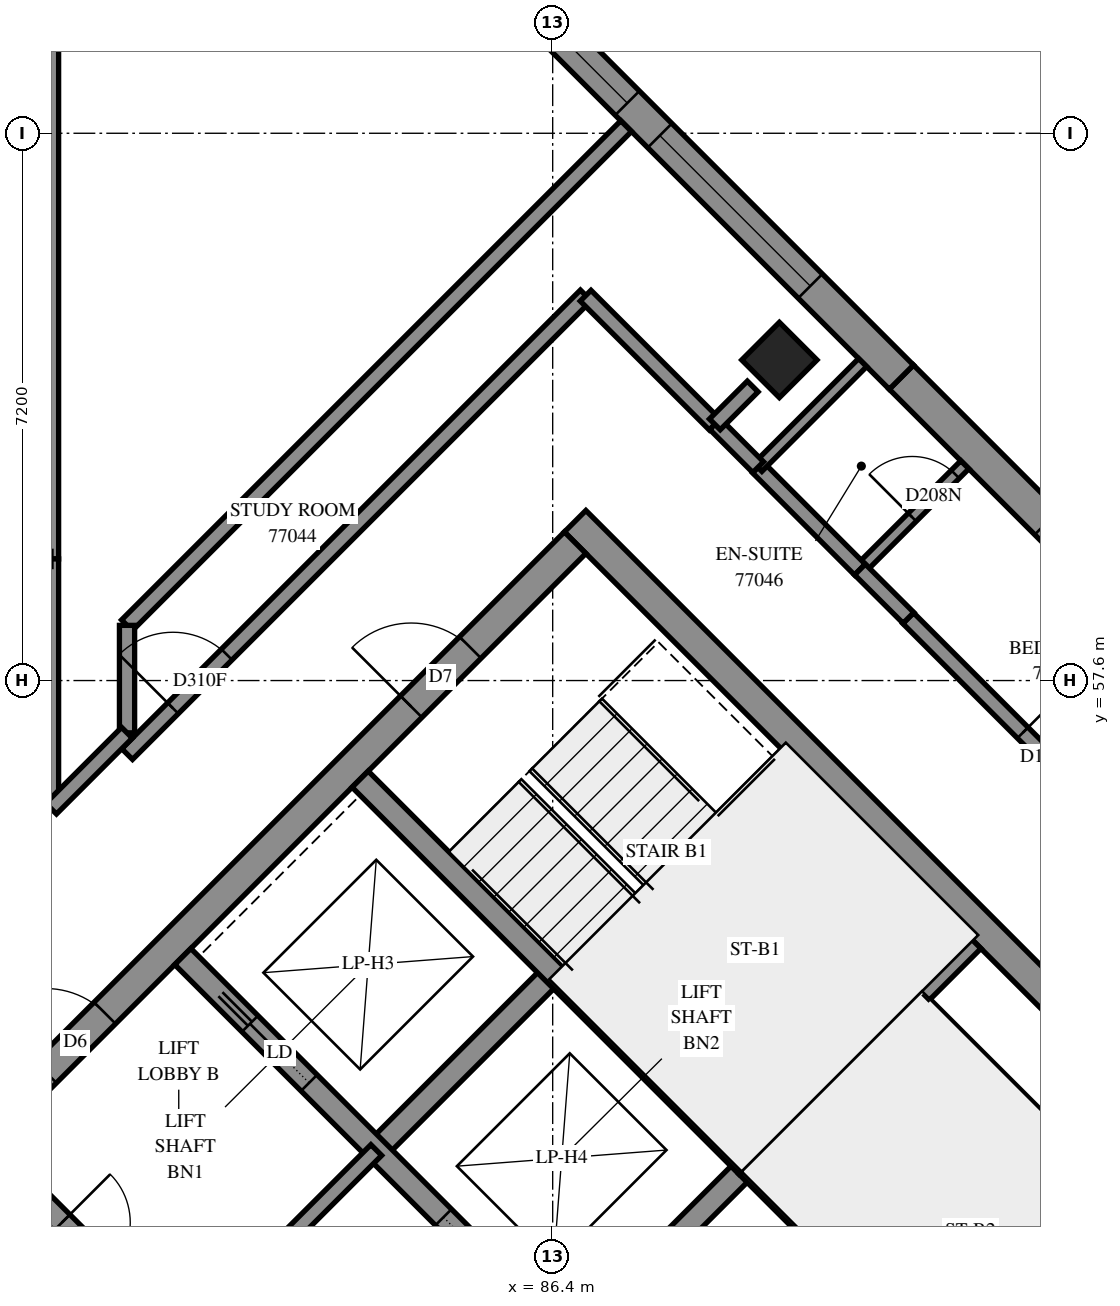
"""IFC4 building model, lengths in metres.
Left out: names, types, materials, properties, quantities, classifications, styles, units other than length and angle.
Written with IfcOpenShell. Run it as: python <this file> out.ifc"""

import sys

from ifc_helpers import new_model, si_unit, direction, frame, frame_2d, origin, origin_2d, place, context, subcontext, project, spatial, polyline, rectangle, outline, extrude, element, fill, save


model = new_model("IFC4")
c1 = context("Model", 3, precision=1e-05, world=origin(), true_north=direction((0.0, 1.0)))
c2 = subcontext(c1, "Body", "Model", "MODEL_VIEW")
j1 = project(units=[si_unit("LENGTHUNIT", "METRE"), si_unit("PLANEANGLEUNIT", "RADIAN")], contexts=[c1])
p1 = place(None, origin())
s1 = spatial("IfcSite", under=j1, at=p1, CompositionType="ELEMENT")
p2 = place(p1, origin())
s2 = spatial("IfcBuilding", under=s1, at=p2, CompositionType="ELEMENT")
p3 = place(p2, frame((0.0, 0.0, 281.2)))
s3 = spatial("IfcBuildingStorey", under=s2, at=p3, CompositionType="ELEMENT", Elevation=281.2)
p4 = place(p3, frame((89.382, 61.818, 0.0), z_axis=(0.0, 0.0, 1.0), x_axis=(0.7071067812, -0.7071067812, 0.0)))
e1 = element("IfcColumn", 1, at=p4, inside=s3, PredefinedType="COLUMN", context=c2, shape_type="SweptSolid", body=[
    extrude(rectangle(XDim=0.7, YDim=0.7, at=origin_2d()), origin(), (0.0, 0.0, 1.0), 3.1),
])
p5 = place(p3, frame((86.695, 59.696, -0.3), z_axis=(0.0, 0.0, 1.0), x_axis=(0.7071100706, -0.7071034917, 0.0)))
e2 = element("IfcWall", 2, at=p5, inside=s3, PredefinedType="SHEAR", context=c2, shape_type="SweptSolid", body=[
    extrude(rectangle(XDim=15.2, YDim=0.4, at=frame_2d((7.6, 0.0))), origin(), (0.0, 0.0, 1.0), 2.7),
])
p6 = place(p5, frame((10.4, 0.0, 0.3)))
e3 = element("IfcOpeningElement", 3, at=p6, cuts=e2, PredefinedType="OPENING", context=c2, shape_type="SweptSolid", body=[
    extrude(rectangle(XDim=0.8, YDim=2.1, at=frame_2d((0.4, 1.05))), frame((0.0, 0.21, 0.0), z_axis=(0.0, -1.0, 0.0), x_axis=(1.0, 0.0, 0.0)), (0.0, 0.0, 1.0), 0.42),
])
p7 = place(p3, frame((76.513, 49.231, -0.3), z_axis=(0.0, 0.0, 1.0), x_axis=(0.7071067812, 0.7071067812, 0.0)))
e4 = element("IfcWall", 4, at=p7, inside=s3, PredefinedType="SHEAR", context=c2, shape_type="SweptSolid", body=[
    extrude(rectangle(XDim=14.4, YDim=0.4, at=frame_2d((7.2, 0.0))), origin(), (0.0, 0.0, 1.0), 2.7),
])
p8 = place(p7, frame((4.55, 0.0, 0.3)))
e5 = element("IfcOpeningElement", 5, at=p8, cuts=e4, PredefinedType="OPENING", context=c2, shape_type="SweptSolid", body=[
    extrude(rectangle(XDim=1.1, YDim=2.1, at=frame_2d((0.55, 1.05))), frame((0.0, 0.21, 0.0), z_axis=(0.0, -1.0, 0.0), x_axis=(1.0, 0.0, 0.0)), (0.0, 0.0, 1.0), 0.42),
])
p9 = place(p7, frame((11.35, 0.0, 0.3)))
e6 = element("IfcOpeningElement", 6, at=p9, cuts=e4, PredefinedType="OPENING", context=c2, shape_type="SweptSolid", body=[
    extrude(rectangle(XDim=1.1, YDim=2.1, at=frame_2d((0.55, 1.05))), frame((0.0, 0.21, 0.0), z_axis=(0.0, -1.0, 0.0), x_axis=(1.0, 0.0, 0.0)), (0.0, 0.0, 1.0), 0.42),
])
p10 = place(p3, frame((84.079, 51.423, 0.0), z_axis=(0.0, 0.0, 1.0), x_axis=(0.7071219326, 0.7070916295, 0.0)))
e7 = element("IfcWall", 7, at=p10, inside=s3, PredefinedType="SOLIDWALL", context=c2, shape_type="SweptSolid", body=[
    extrude(rectangle(XDim=3.3, YDim=0.3, at=frame_2d((1.65, 0.0))), origin(), (0.0, 0.0, 1.0), 3.1),
])
p11 = place(p3, frame((86.625, 48.878, 0.0), z_axis=(0.0, 0.0, 1.0), x_axis=(0.7071067812, 0.7071067812, 0.0)))
e8 = element("IfcWall", 8, at=p11, inside=s3, PredefinedType="SOLIDWALL", context=c2, shape_type="SweptSolid", body=[
    extrude(rectangle(XDim=3.3, YDim=0.3, at=frame_2d((1.65, 0.0))), origin(), (0.0, 0.0, 1.0), 3.1),
])
p12 = place(p3, frame((78.988, 51.423, 0.0), z_axis=(0.0, 0.0, 1.0), x_axis=(0.7071067812, -0.7071067812, 0.0)))
e9 = element("IfcWall", 9, at=p12, inside=s3, PredefinedType="SOLIDWALL", context=c2, shape_type="SweptSolid", body=[
    extrude(rectangle(XDim=14.4, YDim=0.3, at=frame_2d((7.2, 0.0))), origin(), (0.0, 0.0, 1.0), 3.1),
])
p13 = place(p12, frame((1.35, 0.0, 0.0)))
e10 = element("IfcOpeningElement", 10, at=p13, cuts=e9, PredefinedType="OPENING", context=c2, shape_type="SweptSolid", body=[
    extrude(rectangle(XDim=0.9, YDim=2.1, at=frame_2d((0.45, 1.05))), frame((0.0, 0.16, 0.0), z_axis=(0.0, -1.0, 0.0), x_axis=(1.0, 0.0, 0.0)), (0.0, 0.0, 1.0), 0.32),
])
p14 = place(p12, frame((4.95, 0.0, 0.0)))
e11 = element("IfcOpeningElement", 11, at=p14, cuts=e9, PredefinedType="OPENING", context=c2, shape_type="SweptSolid", body=[
    extrude(rectangle(XDim=0.9, YDim=2.1, at=frame_2d((0.45, 1.05))), frame((0.0, 0.16, 0.0), z_axis=(0.0, -1.0, 0.0), x_axis=(1.0, 0.0, 0.0)), (0.0, 0.0, 1.0), 0.32),
])
p15 = place(p12, frame((8.55, 0.0, 0.0)))
e12 = element("IfcOpeningElement", 12, at=p15, cuts=e9, PredefinedType="OPENING", context=c2, shape_type="SweptSolid", body=[
    extrude(rectangle(XDim=0.9, YDim=2.1, at=frame_2d((0.45, 1.05))), frame((0.0, 0.16, 0.0), z_axis=(0.0, -1.0, 0.0), x_axis=(1.0, 0.0, 0.0)), (0.0, 0.0, 1.0), 0.32),
])
p16 = place(p12, frame((12.05, 0.0, 0.0)))
e13 = element("IfcOpeningElement", 13, at=p16, cuts=e9, PredefinedType="OPENING", context=c2, shape_type="SweptSolid", body=[
    extrude(rectangle(XDim=1.1, YDim=2.1, at=frame_2d((0.55, 1.05))), frame((0.0, 0.16, 0.0), z_axis=(0.0, -1.0, 0.0), x_axis=(1.0, 0.0, 0.0)), (0.0, 0.0, 1.0), 0.32),
])
p17 = place(p3, frame((81.534, 53.969, 0.0), z_axis=(0.0, 0.0, 1.0), x_axis=(0.707103309, -0.7071102534, 0.0)))
e14 = element("IfcWall", 14, at=p17, inside=s3, PredefinedType="SOLIDWALL", context=c2, shape_type="SweptSolid", body=[
    extrude(rectangle(XDim=14.4, YDim=0.3, at=frame_2d((7.2, 0.0))), origin(), (0.0, 0.0, 1.0), 3.1),
])
p18 = place(p17, frame((8.55, 0.0, 0.0)))
e15 = element("IfcOpeningElement", 15, at=p18, cuts=e14, PredefinedType="OPENING", context=c2, shape_type="SweptSolid", body=[
    extrude(rectangle(XDim=0.9, YDim=2.1, at=frame_2d((0.45, 1.05))), frame((0.0, 0.16, 0.0), z_axis=(0.0, -1.0, 0.0), x_axis=(1.0, 0.0, 0.0)), (0.0, 0.0, 1.0), 0.32),
])
p19 = place(p17, frame((1.25, 0.0, 0.0)))
e16 = element("IfcOpeningElement", 16, at=p19, cuts=e14, PredefinedType="OPENING", context=c2, shape_type="SweptSolid", body=[
    extrude(rectangle(XDim=1.1, YDim=2.1, at=frame_2d((0.55, 1.05))), frame((0.0, 0.16, 0.0), z_axis=(0.0, -1.0, 0.0), x_axis=(1.0, 0.0, 0.0)), (0.0, 0.0, 1.0), 0.32),
])
p20 = place(p17, frame((4.85, 0.0, 0.0)))
e17 = element("IfcOpeningElement", 17, at=p20, cuts=e14, PredefinedType="OPENING", context=c2, shape_type="SweptSolid", body=[
    extrude(rectangle(XDim=1.1, YDim=2.1, at=frame_2d((0.55, 1.05))), frame((0.0, 0.16, 0.0), z_axis=(0.0, -1.0, 0.0), x_axis=(1.0, 0.0, 0.0)), (0.0, 0.0, 1.0), 0.32),
])
p21 = place(p17, frame((12.05, 0.0, 0.0)))
e18 = element("IfcOpeningElement", 18, at=p21, cuts=e14, PredefinedType="OPENING", context=c2, shape_type="SweptSolid", body=[
    extrude(rectangle(XDim=1.1, YDim=2.1, at=frame_2d((0.55, 1.05))), frame((0.0, 0.16, 0.0), z_axis=(0.0, -1.0, 0.0), x_axis=(1.0, 0.0, 0.0)), (0.0, 0.0, 1.0), 0.32),
])
for number, where, z_axis, x_axis in (
    (19, (83.867, 56.302, 0.0), (0.0, 0.0, 1.0), (0.707, -0.707, 0.0)),
    (20, (88.958, 51.211, 0.0), (0.0, 0.0, 1.0), (0.707, -0.707, 0.0)),
):
    element("IfcWall", number, at=place(p3, frame(where, z_axis=z_axis, x_axis=x_axis)), inside=s3, PredefinedType="SOLIDWALL", context=c2, shape_type="SweptSolid", body=[
        extrude(rectangle(XDim=7.2, YDim=0.3, at=frame_2d((3.6, 0.0))), origin(), (0.0, 0.0, 1.0), 3.1),
    ])
p22 = place(p3, frame((88.958, 51.211, 0.0), z_axis=(0.0, 0.0, 1.0), x_axis=(0.7071067812, 0.7071067812, 0.0)))
e21 = element("IfcWall", 21, at=p22, inside=s3, PredefinedType="SOLIDWALL", context=c2, shape_type="SweptSolid", body=[
    extrude(rectangle(XDim=4.2, YDim=0.3, at=frame_2d((2.1, 0.0))), origin(), (0.0, 0.0, 1.0), 3.1),
])
p23 = place(p3, frame((95.712, 56.867, 0.0), z_axis=(0.0, 0.0, 1.0), x_axis=(-0.7071067812, 0.7071067812, 0.0)))
e22 = element("IfcWall", 22, at=p23, inside=s3, PredefinedType="SOLIDWALL", context=c2, shape_type="SweptSolid", body=[
    extrude(outline(polyline([(0.0, -0.225), (6.682, -0.225), (6.682, 0.225), (0.0, 0.225), (0.0, -0.225)])), origin(), (0.0, 0.0, 1.0), 3.1),
])
p24 = place(p23, frame((1.177, 0.0, 0.45)))
e23 = element("IfcOpeningElement", 23, at=p24, cuts=e22, PredefinedType="OPENING", context=c2, shape_type="SweptSolid", body=[
    extrude(rectangle(XDim=2.8, YDim=2.55, at=frame_2d((1.4, 1.275))), frame((0.0, 0.235, 0.0), z_axis=(0.0, -1.0, 0.0), x_axis=(1.0, 0.0, 0.0)), (0.0, 0.0, 1.0), 0.47),
])
p25 = place(p3, frame((90.987, 61.592, 0.0), z_axis=(0.0, 0.0, 1.0), x_axis=(-0.7071067812, 0.7071067812, 0.0)))
e24 = element("IfcWall", 24, at=p25, inside=s3, PredefinedType="SOLIDWALL", context=c2, shape_type="SweptSolid", body=[
    extrude(outline(polyline([(0.0, -0.225), (6.682, -0.225), (6.724, 0.225), (0.0, 0.225), (0.0, -0.225)])), origin(), (0.0, 0.0, 1.0), 3.1),
])
p26 = place(p25, frame((1.695, 0.0, 0.45)))
e25 = element("IfcOpeningElement", 25, at=p26, cuts=e24, PredefinedType="OPENING", context=c2, shape_type="SweptSolid", body=[
    extrude(rectangle(XDim=2.8, YDim=2.55, at=frame_2d((1.4, 1.275))), frame((0.0, 0.235, 0.0), z_axis=(0.0, -1.0, 0.0), x_axis=(1.0, 0.0, 0.0)), (0.0, 0.0, 1.0), 0.47),
])
p27 = place(p25, frame((5.099, 0.0, 0.45)))
e26 = element("IfcOpeningElement", 26, at=p27, cuts=e24, PredefinedType="OPENING", context=c2, shape_type="SweptSolid", body=[
    extrude(rectangle(XDim=1.2, YDim=2.55, at=frame_2d((0.6, 1.275))), frame((0.0, 0.235, 0.0), z_axis=(0.0, -1.0, 0.0), x_axis=(1.0, 0.0, 0.0)), (0.0, 0.0, 1.0), 0.47),
])
p28 = place(p3, frame((91.313, 53.354, 0.0), z_axis=(0.0, 0.0, 1.0), x_axis=(0.7071067812, -0.7071067812, 0.0)))
e27 = element("IfcWall", 27, at=p28, inside=s3, PredefinedType="PARTITIONING", context=c2, shape_type="SweptSolid", body=[
    extrude(rectangle(XDim=5.65, YDim=0.15, at=frame_2d((2.825, 0.0))), origin(), (0.0, 0.0, 1.0), 3.1),
])
p29 = place(p3, frame((81.534, 48.878, 0.0), z_axis=(0.0, 0.0, 1.0), x_axis=(0.707092892, 0.7071206701, 0.0)))
e28 = element("IfcWall", 28, at=p29, inside=s3, PredefinedType="PARTITIONING", context=c2, shape_type="SweptSolid", body=[
    extrude(rectangle(XDim=3.6, YDim=0.2, at=frame_2d((1.8, 0.0))), origin(), (0.0, 0.0, 1.0), 3.1),
])
p30 = place(p3, frame((79.8, 59.2, 0.0), z_axis=(0.0, 0.0, 1.0), x_axis=(0.0, 1.0, 0.0)))
e29 = element("IfcWall", 29, at=p30, inside=s3, PredefinedType="PARTITIONING", context=c2, shape_type="SweptSolid", body=[
    extrude(rectangle(XDim=13.8, YDim=0.2, at=frame_2d((6.9, 0.0))), origin(), (0.0, 0.0, 1.0), 3.1),
])
p31 = place(p3, frame((80.799, 58.327, 0.0), z_axis=(0.0, 0.0, 1.0), x_axis=(0.7071121647, 0.7071013977, 0.0)))
e30 = element("IfcWall", 30, at=p31, inside=s3, PredefinedType="PARTITIONING", context=c2, shape_type="SweptSolid", body=[
    extrude(rectangle(XDim=9.288, YDim=0.2, at=frame_2d((4.644, 0.0))), origin(), (0.0, 0.0, 1.0), 3.1),
])
p32 = place(p3, frame((80.802, 56.633, 0.0), z_axis=(0.0, 0.0, 1.0), x_axis=(0.7071067812, 0.7071067812, 0.0)))
e31 = element("IfcWall", 31, at=p32, inside=s3, PredefinedType="PARTITIONING", context=c2, shape_type="SweptSolid", body=[
    extrude(rectangle(XDim=8.533, YDim=0.2, at=frame_2d((4.267, 0.0))), origin(), (0.0, 0.0, 1.0), 3.1),
])
p33 = place(p32, frame((0.853, 0.0, 0.0)))
e32 = element("IfcOpeningElement", 32, at=p33, cuts=e31, PredefinedType="OPENING", context=c2, shape_type="SweptSolid", body=[
    extrude(rectangle(XDim=1.0, YDim=2.1, at=frame_2d((0.5, 1.05))), frame((0.0, 0.11, 0.0), z_axis=(0.0, -1.0, 0.0), x_axis=(1.0, 0.0, 0.0)), (0.0, 0.0, 1.0), 0.22),
])
p34 = place(p3, frame((91.077, 58.421, 0.0), z_axis=(0.0, 0.0, 1.0), x_axis=(0.7069869563, -0.7072265858, 0.0)))
e33 = element("IfcWall", 33, at=p34, inside=s3, PredefinedType="PARTITIONING", context=c2, shape_type="SweptSolid", body=[
    extrude(rectangle(XDim=5.008, YDim=0.2, at=frame_2d((2.504, 0.0))), origin(), (0.0, 0.0, 1.0), 3.1),
])
p35 = place(p34, frame((2.132, 0.0, 0.0)))
e34 = element("IfcOpeningElement", 34, at=p35, cuts=e33, PredefinedType="OPENING", context=c2, shape_type="SweptSolid", body=[
    extrude(rectangle(XDim=0.9, YDim=2.1, at=frame_2d((0.45, 1.05))), frame((0.0, 0.11, 0.0), z_axis=(0.0, -1.0, 0.0), x_axis=(1.0, 0.0, 0.0)), (0.0, 0.0, 1.0), 0.22),
])
p36 = place(p3, frame((79.8, 55.914, 0.0), z_axis=(0.0, 0.0, 1.0), x_axis=(0.0, 1.0, 0.0)))
e35 = element("IfcWall", 35, at=p36, inside=s3, PredefinedType="PARTITIONING", context=c2, shape_type="SweptSolid", body=[
    extrude(rectangle(XDim=3.286, YDim=0.2, at=frame_2d((1.643, 0.0))), origin(), (0.0, 0.0, 1.0), 3.1),
])
p37 = place(p3, frame((86.833, 62.663, 0.0), z_axis=(0.0, 0.0, 1.0), x_axis=(0.7075233388, -0.706689978, 0.0)))
e36 = element("IfcWall", 36, at=p37, inside=s3, PredefinedType="PARTITIONING", context=c2, shape_type="SweptSolid", body=[
    extrude(rectangle(XDim=2.4, YDim=0.2, at=frame_2d((1.2, 0.0))), origin(), (0.0, 0.0, 1.0), 3.1),
])
p38 = place(p3, frame((90.442, 59.06, 0.0), z_axis=(0.0, 0.0, 1.0), x_axis=(0.7076448457, 0.7065683069, 0.0)))
e37 = element("IfcWall", 37, at=p38, inside=s3, PredefinedType="PARTITIONING", context=c2, shape_type="SweptSolid", body=[
    extrude(rectangle(XDim=1.951, YDim=0.15, at=frame_2d((0.975, 0.0))), origin(), (0.0, 0.0, 1.0), 3.1),
])
p39 = place(p38, frame((0.973, 0.0, 0.0)))
e38 = element("IfcOpeningElement", 38, at=p39, cuts=e37, PredefinedType="OPENING", context=c2, shape_type="SweptSolid", body=[
    extrude(rectangle(XDim=0.8, YDim=2.1, at=frame_2d((0.4, 1.05))), frame((0.0, 0.085, 0.0), z_axis=(0.0, -1.0, 0.0), x_axis=(1.0, 0.0, 0.0)), (0.0, 0.0, 1.0), 0.17),
])
p40 = place(p3, frame((89.1, 60.404, 0.0), z_axis=(0.0, 0.0, 1.0), x_axis=(0.7065800724, -0.7076330979, 0.0)))
e39 = element("IfcWall", 39, at=p40, inside=s3, PredefinedType="PARTITIONING", context=c2, shape_type="SweptSolid", body=[
    extrude(rectangle(XDim=1.899, YDim=0.2, at=frame_2d((0.95, 0.0))), origin(), (0.0, 0.0, 1.0), 3.1),
])
p41 = place(p3, frame((89.099, 60.405, 0.0), z_axis=(0.0, 0.0, 1.0), x_axis=(0.7070811302, 0.7071324312, 0.0)))
e40 = element("IfcWall", 40, at=p41, inside=s3, PredefinedType="PARTITIONING", context=c2, shape_type="SweptSolid", body=[
    extrude(rectangle(XDim=1.949, YDim=0.15, at=frame_2d((0.975, 0.0))), origin(), (0.0, 0.0, 1.0), 3.1),
])
p42 = place(p3, frame((80.8, 56.912, 0.0), z_axis=(0.0, 0.0, 1.0), x_axis=(0.0, 1.0, 0.0)))
e41 = element("IfcWall", 41, at=p42, inside=s3, PredefinedType="PARTITIONING", context=c2, shape_type="SweptSolid", body=[
    extrude(rectangle(XDim=1.414, YDim=0.2, at=frame_2d((0.707, 0.0))), origin(), (0.0, 0.0, 1.0), 3.1),
])
p43 = place(p3, frame((79.801, 55.915, 0.0), z_axis=(0.0, 0.0, 1.0), x_axis=(0.7071067812, 0.7071067812, 0.0)))
e42 = element("IfcWall", 42, at=p43, inside=s3, PredefinedType="PARTITIONING", context=c2, shape_type="SweptSolid", body=[
    extrude(rectangle(XDim=1.411, YDim=0.2, at=frame_2d((0.706, 0.0))), origin(), (0.0, 0.0, 1.0), 3.1),
])
p44 = place(p3, frame((90.443, 59.061, 0.0), z_axis=(0.0, 0.0, 1.0), x_axis=(0.7082159662, -0.7059958535, 0.0)))
e43 = element("IfcWall", 43, at=p44, inside=s3, PredefinedType="PARTITIONING", context=c2, shape_type="SweptSolid", body=[
    extrude(rectangle(XDim=0.901, YDim=0.2, at=frame_2d((0.451, 0.0))), origin(), (0.0, 0.0, 1.0), 3.1),
])
p45 = place(p3, frame((88.537, 60.973, 0.0), z_axis=(0.0, 0.0, 1.0), x_axis=(0.7071067812, -0.7071067812, 0.0)))
e44 = element("IfcWall", 44, at=p45, inside=s3, PredefinedType="PARTITIONING", context=c2, shape_type="SweptSolid", body=[
    extrude(rectangle(XDim=0.8, YDim=0.2, at=frame_2d((0.4, 0.0))), origin(), (0.0, 0.0, 1.0), 3.1),
])
p46 = place(p3, frame((88.534, 60.971, 0.0), z_axis=(0.0, 0.0, 1.0), x_axis=(0.7071067812, 0.7071067812, 0.0)))
e45 = element("IfcWall", 45, at=p46, inside=s3, PredefinedType="PARTITIONING", context=c2, shape_type="SweptSolid", body=[
    extrude(rectangle(XDim=0.704, YDim=0.2, at=frame_2d((0.352, 0.0))), origin(), (0.0, 0.0, 1.0), 3.1),
])
p47 = place(p24, origin())
e46 = element("IfcWindow", 46, at=p47, inside=s3, PartitioningType="SINGLE_PANEL", PredefinedType="WINDOW", context=c2, shape_type="SweptSolid", body=[
    extrude(rectangle(XDim=2.8, YDim=2.55, at=frame_2d((1.4, 1.275))), frame((0.0, 0.205, 0.0), z_axis=(0.0, -1.0, 0.0), x_axis=(1.0, 0.0, 0.0)), (0.0, 0.0, 1.0), 0.06),
])
fill(e23, e46)
p48 = place(p26, origin())
e47 = element("IfcWindow", 47, at=p48, inside=s3, PartitioningType="SINGLE_PANEL", PredefinedType="WINDOW", context=c2, shape_type="SweptSolid", body=[
    extrude(rectangle(XDim=2.8, YDim=2.55, at=frame_2d((1.4, 1.275))), frame((0.0, 0.205, 0.0), z_axis=(0.0, -1.0, 0.0), x_axis=(1.0, 0.0, 0.0)), (0.0, 0.0, 1.0), 0.06),
])
fill(e25, e47)
p49 = place(p27, origin())
e48 = element("IfcWindow", 48, at=p49, inside=s3, PartitioningType="SINGLE_PANEL", PredefinedType="WINDOW", context=c2, shape_type="SweptSolid", body=[
    extrude(rectangle(XDim=1.2, YDim=2.55, at=frame_2d((0.6, 1.275))), frame((0.0, 0.205, 0.0), z_axis=(0.0, -1.0, 0.0), x_axis=(1.0, 0.0, 0.0)), (0.0, 0.0, 1.0), 0.06),
])
fill(e26, e48)
p50 = place(p8, origin())
e49 = element("IfcDoor", 49, at=p50, inside=s3, OperationType="DOUBLE_DOOR_SINGLE_SWING", PredefinedType="DOOR", context=c2, shape_type="SweptSolid", body=[
    extrude(rectangle(XDim=1.1, YDim=2.1, at=frame_2d((0.55, 1.05))), frame((0.0, 0.025, 0.0), z_axis=(0.0, -1.0, 0.0), x_axis=(1.0, 0.0, 0.0)), (0.0, 0.0, 1.0), 0.05),
])
fill(e5, e49)
p51 = place(p9, origin())
e50 = element("IfcDoor", 50, at=p51, inside=s3, OperationType="SINGLE_SWING_LEFT", PredefinedType="DOOR", context=c2, shape_type="SweptSolid", body=[
    extrude(rectangle(XDim=1.1, YDim=2.1, at=frame_2d((0.55, 1.05))), frame((0.0, 0.025, 0.0), z_axis=(0.0, -1.0, 0.0), x_axis=(1.0, 0.0, 0.0)), (0.0, 0.0, 1.0), 0.05),
])
fill(e6, e50)
p52 = place(p13, origin())
e51 = element("IfcDoor", 51, at=p52, inside=s3, OperationType="SINGLE_SWING_LEFT", PredefinedType="DOOR", context=c2, shape_type="SweptSolid", body=[
    extrude(rectangle(XDim=0.9, YDim=2.1, at=frame_2d((0.45, 1.05))), frame((0.0, 0.025, 0.0), z_axis=(0.0, -1.0, 0.0), x_axis=(1.0, 0.0, 0.0)), (0.0, 0.0, 1.0), 0.05),
])
fill(e10, e51)
p53 = place(p19, origin())
e52 = element("IfcDoor", 52, at=p53, inside=s3, OperationType="SLIDING_TO_LEFT", PredefinedType="DOOR", context=c2, shape_type="SweptSolid", body=[
    extrude(rectangle(XDim=1.1, YDim=2.1, at=frame_2d((0.55, 1.05))), frame((0.0, 0.025, 0.0), z_axis=(0.0, -1.0, 0.0), x_axis=(1.0, 0.0, 0.0)), (0.0, 0.0, 1.0), 0.05),
])
fill(e16, e52)
p54 = place(p20, origin())
e53 = element("IfcDoor", 53, at=p54, inside=s3, OperationType="SLIDING_TO_RIGHT", PredefinedType="DOOR", context=c2, shape_type="SweptSolid", body=[
    extrude(rectangle(XDim=1.1, YDim=2.1, at=frame_2d((0.55, 1.05))), frame((0.0, 0.025, 0.0), z_axis=(0.0, -1.0, 0.0), x_axis=(1.0, 0.0, 0.0)), (0.0, 0.0, 1.0), 0.05),
])
fill(e17, e53)
p55 = place(p33, origin())
e54 = element("IfcDoor", 54, at=p55, inside=s3, OperationType="SINGLE_SWING_RIGHT", PredefinedType="DOOR", context=c2, shape_type="SweptSolid", body=[
    extrude(rectangle(XDim=1.0, YDim=2.1, at=frame_2d((0.5, 1.05))), frame((0.0, 0.025, 0.0), z_axis=(0.0, -1.0, 0.0), x_axis=(1.0, 0.0, 0.0)), (0.0, 0.0, 1.0), 0.05),
])
fill(e32, e54)
p56 = place(p35, origin())
e55 = element("IfcDoor", 55, at=p56, inside=s3, OperationType="SINGLE_SWING_LEFT", PredefinedType="DOOR", context=c2, shape_type="SweptSolid", body=[
    extrude(rectangle(XDim=0.9, YDim=2.1, at=frame_2d((0.45, 1.05))), frame((0.0, 0.025, 0.0), z_axis=(0.0, -1.0, 0.0), x_axis=(1.0, 0.0, 0.0)), (0.0, 0.0, 1.0), 0.05),
])
fill(e34, e55)
p57 = place(p39, origin())
e56 = element("IfcDoor", 56, at=p57, inside=s3, OperationType="SINGLE_SWING_RIGHT", PredefinedType="DOOR", context=c2, shape_type="SweptSolid", body=[
    extrude(rectangle(XDim=0.8, YDim=2.1, at=frame_2d((0.4, 1.05))), frame((0.0, 0.025, 0.0), z_axis=(0.0, -1.0, 0.0), x_axis=(1.0, 0.0, 0.0)), (0.0, 0.0, 1.0), 0.05),
])
fill(e38, e56)
save(model, sys.argv[1])
